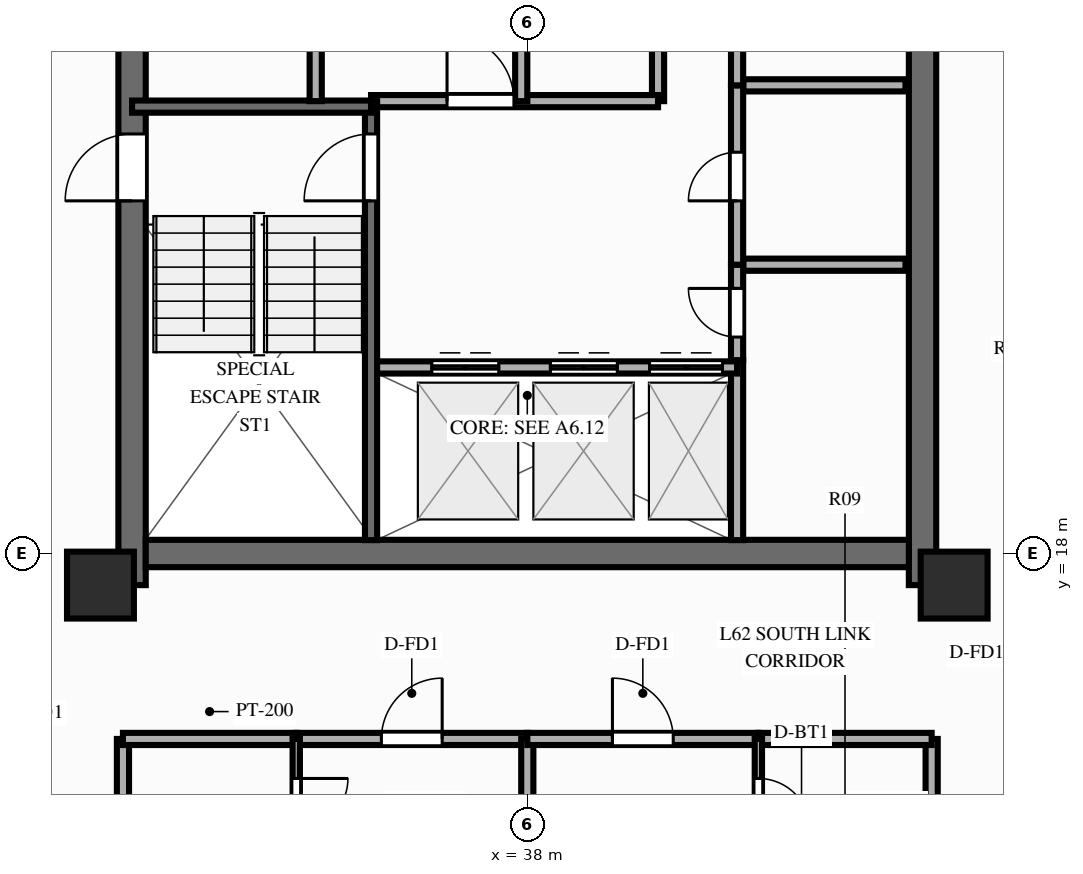
"""IFC4 building model, lengths in metres.
Left out: names, types, materials, properties, quantities, classifications, styles, units other than length and angle.
Written with IfcOpenShell. Run it as: python <this file> out.ifc"""

import sys

from ifc_helpers import new_model, si_unit, direction, frame, frame_2d, origin, origin_2d, place, context, subcontext, project, spatial, rectangle, extrude, source, transform, mapped, element, fill, save


model = new_model("IFC4")
c1 = context("Model", 3, precision=1e-05, world=origin(), true_north=direction((0.0, 1.0)))
c2 = subcontext(c1, "Body", "Model", "MODEL_VIEW")
j1 = project(units=[si_unit("LENGTHUNIT", "METRE"), si_unit("PLANEANGLEUNIT", "RADIAN")], contexts=[c1])
p1 = place(None, origin())
s1 = spatial("IfcSite", under=j1, at=p1, CompositionType="ELEMENT")
p2 = place(p1, origin())
s2 = spatial("IfcBuilding", under=s1, at=p2, CompositionType="ELEMENT")
p3 = place(p2, frame((0.0, 0.0, 199.6)))
s3 = spatial("IfcBuildingStorey", under=s2, at=p3, CompositionType="ELEMENT", Elevation=199.6)
p4 = place(p3, frame((31.5, 17.48, 0.0), z_axis=(0.0, 0.0, 1.0), x_axis=(0.0, 1.0, 0.0)))
e1 = element("IfcWall", 1, at=p4, inside=s3, PredefinedType="SHEAR", context=c2, shape_type="SweptSolid", body=[
    extrude(rectangle(XDim=19.04, YDim=0.45, at=frame_2d((9.52, 0.0))), origin(), (0.0, 0.0, 1.0), 3.0),
])
p5 = place(p4, frame((6.32, 0.0, 0.0)))
e2 = element("IfcOpeningElement", 2, at=p5, cuts=e1, PredefinedType="OPENING", context=c2, shape_type="SweptSolid", body=[
    extrude(rectangle(XDim=1.1, YDim=2.15, at=frame_2d((0.55, 1.075))), frame((0.0, 0.237, 0.0), z_axis=(0.0, -1.0, 0.0), x_axis=(1.0, 0.0, 0.0)), (0.0, 0.0, 1.0), 0.474),
])
p6 = place(p3, frame((44.5, 17.48, 0.0), z_axis=(0.0, 0.0, 1.0), x_axis=(0.0, 1.0, 0.0)))
e3 = element("IfcWall", 3, at=p6, inside=s3, PredefinedType="SHEAR", context=c2, shape_type="SweptSolid", body=[
    extrude(rectangle(XDim=19.04, YDim=0.45, at=frame_2d((9.52, 0.0))), origin(), (0.0, 0.0, 1.0), 3.0),
])
p7 = place(p6, frame((12.67, 0.0, 0.0), z_axis=(0.0, 0.0, 1.0), x_axis=(-1.0, 0.0, 0.0)))
e4 = element("IfcOpeningElement", 4, at=p7, cuts=e3, PredefinedType="OPENING", context=c2, shape_type="SweptSolid", body=[
    extrude(rectangle(XDim=1.1, YDim=2.15, at=frame_2d((0.55, 1.075))), frame((0.0, 0.237, 0.0), z_axis=(0.0, -1.0, 0.0), x_axis=(1.0, 0.0, 0.0)), (0.0, 0.0, 1.0), 0.474),
])
p8 = place(p3, frame((31.725, 18.0, 0.0), z_axis=(0.0, 0.0, 1.0), x_axis=(1.0, 0.0, 0.0)))
e5 = element("IfcWall", 5, at=p8, inside=s3, PredefinedType="SHEAR", context=c2, shape_type="SweptSolid", body=[
    extrude(rectangle(XDim=12.55, YDim=0.45, at=frame_2d((6.275, 0.0))), origin(), (0.0, 0.0, 1.0), 3.0),
])
m1 = source(origin(), c2, "Body", "SweptSolid", [
    extrude(rectangle(XDim=1.1, YDim=1.1, at=origin_2d()), origin(), (0.0, 0.0, 1.0), 3.0),
])
for number, where, z_axis, x_axis in (
    (6, (30.98, 17.48, 0.0), (0.0, 0.0, 1.0), (1.0, 0.0, 0.0)),
    (7, (45.02, 17.48, 0.0), (0.0, 0.0, 1.0), (1.0, 0.0, 0.0)),
):
    element("IfcColumn", number, at=place(p3, frame(where, z_axis=z_axis, x_axis=x_axis)), inside=s3, PredefinedType="COLUMN", context=c2, shape_type="MappedRepresentation", body=[
        mapped(m1, transform((0.0, 0.0, 0.0), scale=1.0)),
    ])
p9 = place(p3, frame((41.55, 22.75, 0.0), z_axis=(0.0, 0.0, 1.0), x_axis=(1.0, 0.0, 0.0)))
e8 = element("IfcWall", 8, at=p9, inside=s3, PredefinedType="PARTITIONING", context=c2, shape_type="SweptSolid", body=[
    extrude(rectangle(XDim=2.67, YDim=0.2, at=frame_2d((1.335, 0.0))), origin(), (0.0, 0.0, 1.0), 2.79),
])
p10 = place(p3, frame((41.55, 25.7, 0.0), z_axis=(0.0, 0.0, 1.0), x_axis=(1.0, 0.0, 0.0)))
e9 = element("IfcWall", 9, at=p10, inside=s3, PredefinedType="PARTITIONING", context=c2, shape_type="SweptSolid", body=[
    extrude(rectangle(XDim=2.67, YDim=0.2, at=frame_2d((1.335, 0.0))), origin(), (0.0, 0.0, 1.0), 2.14),
])
p11 = place(p3, frame((41.45, 18.22, 0.0), z_axis=(0.0, 0.0, 1.0), x_axis=(0.0, 1.0, 0.0)))
e10 = element("IfcWall", 10, at=p11, inside=s3, PredefinedType="PARTITIONING", context=c2, shape_type="SweptSolid", body=[
    extrude(rectangle(XDim=2.96, YDim=0.2, at=frame_2d((1.48, 0.0))), origin(), (0.0, 0.0, 1.0), 2.79),
])
p12 = place(p3, frame((41.45, 21.18, 0.0), z_axis=(0.0, 0.0, 1.0), x_axis=(0.0, 1.0, 0.0)))
e11 = element("IfcWall", 11, at=p12, inside=s3, PredefinedType="PARTITIONING", context=c2, shape_type="SweptSolid", body=[
    extrude(rectangle(XDim=1.57, YDim=0.2, at=frame_2d((0.785, 0.0))), origin(), (0.0, 0.0, 1.0), 2.79),
])
p13 = place(p12, frame((0.38, 0.0, 0.0)))
e12 = element("IfcOpeningElement", 12, at=p13, cuts=e11, PredefinedType="OPENING", context=c2, shape_type="SweptSolid", body=[
    extrude(rectangle(XDim=0.8, YDim=2.05, at=frame_2d((0.4, 1.025))), frame((0.0, 0.112, 0.0), z_axis=(0.0, -1.0, 0.0), x_axis=(1.0, 0.0, 0.0)), (0.0, 0.0, 1.0), 0.224),
])
p14 = place(p3, frame((41.45, 22.75, 0.0), z_axis=(0.0, 0.0, 1.0), x_axis=(0.0, 1.0, 0.0)))
e13 = element("IfcWall", 13, at=p14, inside=s3, PredefinedType="PARTITIONING", context=c2, shape_type="SweptSolid", body=[
    extrude(rectangle(XDim=2.95, YDim=0.2, at=frame_2d((1.475, 0.0))), origin(), (0.0, 0.0, 1.0), 2.79),
])
p15 = place(p14, frame((1.05, 0.0, 0.0)))
e14 = element("IfcOpeningElement", 14, at=p15, cuts=e13, PredefinedType="OPENING", context=c2, shape_type="SweptSolid", body=[
    extrude(rectangle(XDim=0.8, YDim=2.05, at=frame_2d((0.4, 1.025))), frame((0.0, 0.112, 0.0), z_axis=(0.0, -1.0, 0.0), x_axis=(1.0, 0.0, 0.0)), (0.0, 0.0, 1.0), 0.224),
])
p16 = place(p3, frame((41.45, 25.7, 0.0), z_axis=(0.0, 0.0, 1.0), x_axis=(0.0, 1.0, 0.0)))
e15 = element("IfcWall", 15, at=p16, inside=s3, PredefinedType="PARTITIONING", context=c2, shape_type="SweptSolid", body=[
    extrude(rectangle(XDim=2.9, YDim=0.2, at=frame_2d((1.45, 0.0))), origin(), (0.0, 0.0, 1.0), 2.79),
])
p17 = place(p16, frame((1.0, 0.0, 0.0)))
e16 = element("IfcOpeningElement", 16, at=p17, cuts=e15, PredefinedType="OPENING", context=c2, shape_type="SweptSolid", body=[
    extrude(rectangle(XDim=0.9, YDim=2.1, at=frame_2d((0.45, 1.05))), frame((0.0, 0.112, 0.0), z_axis=(0.0, -1.0, 0.0), x_axis=(1.0, 0.0, 0.0)), (0.0, 0.0, 1.0), 0.224),
])
p18 = place(p3, frame((40.15, 25.44, 0.0), z_axis=(0.0, 0.0, 1.0), x_axis=(0.0, 1.0, 0.0)))
e17 = element("IfcWall", 17, at=p18, inside=s3, PredefinedType="PARTITIONING", context=c2, shape_type="SweptSolid", body=[
    extrude(rectangle(XDim=6.36, YDim=0.2, at=frame_2d((3.18, 0.0))), origin(), (0.0, 0.0, 1.0), 2.79),
])
p19 = place(p3, frame((35.43, 21.06, 0.0), z_axis=(0.0, 0.0, 1.0), x_axis=(1.0, 0.0, 0.0)))
e18 = element("IfcWall", 18, at=p19, inside=s3, PredefinedType="PARTITIONING", context=c2, shape_type="SweptSolid", body=[
    extrude(rectangle(XDim=6.02, YDim=0.2, at=frame_2d((3.01, 0.0))), origin(), (0.0, 0.0, 1.0), 2.79),
])
p20 = place(p19, frame((1.0, 0.0, 0.0)))
e19 = element("IfcOpeningElement", 19, at=p20, cuts=e18, PredefinedType="OPENING", context=c2, shape_type="SweptSolid", body=[
    extrude(rectangle(XDim=1.1, YDim=2.15, at=frame_2d((0.55, 1.075))), frame((0.0, 0.112, 0.0), z_axis=(0.0, -1.0, 0.0), x_axis=(1.0, 0.0, 0.0)), (0.0, 0.0, 1.0), 0.224),
])
p21 = place(p19, frame((2.95, 0.0, 0.0)))
e20 = element("IfcOpeningElement", 20, at=p21, cuts=e18, PredefinedType="OPENING", context=c2, shape_type="SweptSolid", body=[
    extrude(rectangle(XDim=1.1, YDim=2.15, at=frame_2d((0.55, 1.075))), frame((0.0, 0.112, 0.0), z_axis=(0.0, -1.0, 0.0), x_axis=(1.0, 0.0, 0.0)), (0.0, 0.0, 1.0), 0.224),
])
p22 = place(p19, frame((4.58, 0.0, 0.0)))
e21 = element("IfcOpeningElement", 21, at=p22, cuts=e18, PredefinedType="OPENING", context=c2, shape_type="SweptSolid", body=[
    extrude(rectangle(XDim=1.2, YDim=2.15, at=frame_2d((0.6, 1.075))), frame((0.0, 0.112, 0.0), z_axis=(0.0, -1.0, 0.0), x_axis=(1.0, 0.0, 0.0)), (0.0, 0.0, 1.0), 0.224),
])
p23 = place(p3, frame((35.43, 25.44, 0.0), z_axis=(0.0, 0.0, 1.0), x_axis=(1.0, 0.0, 0.0)))
e22 = element("IfcWall", 22, at=p23, inside=s3, PredefinedType="PARTITIONING", context=c2, shape_type="SweptSolid", body=[
    extrude(rectangle(XDim=4.72, YDim=0.2, at=frame_2d((2.36, 0.0))), origin(), (0.0, 0.0, 1.0), 2.79),
])
p24 = place(p23, frame((1.25, 0.0, 0.0)))
e23 = element("IfcOpeningElement", 23, at=p24, cuts=e22, PredefinedType="OPENING", context=c2, shape_type="SweptSolid", body=[
    extrude(rectangle(XDim=1.1, YDim=2.15, at=frame_2d((0.55, 1.075))), frame((0.0, 0.112, 0.0), z_axis=(0.0, -1.0, 0.0), x_axis=(1.0, 0.0, 0.0)), (0.0, 0.0, 1.0), 0.224),
])
p25 = place(p3, frame((35.43, 18.22, 0.0), z_axis=(0.0, 0.0, 1.0), x_axis=(0.0, 1.0, 0.0)))
e24 = element("IfcWall", 24, at=p25, inside=s3, PredefinedType="SOLIDWALL", context=c2, shape_type="SweptSolid", body=[
    extrude(rectangle(XDim=7.22, YDim=0.2, at=frame_2d((3.61, 0.0))), origin(), (0.0, 0.0, 1.0), 2.79),
])
p26 = place(p25, frame((6.68, 0.0, 0.0), z_axis=(0.0, 0.0, 1.0), x_axis=(-1.0, 0.0, 0.0)))
e25 = element("IfcOpeningElement", 25, at=p26, cuts=e24, PredefinedType="OPENING", context=c2, shape_type="SweptSolid", body=[
    extrude(rectangle(XDim=1.1, YDim=2.15, at=frame_2d((0.55, 1.075))), frame((0.0, 0.112, 0.0), z_axis=(0.0, -1.0, 0.0), x_axis=(1.0, 0.0, 0.0)), (0.0, 0.0, 1.0), 0.224),
])
p27 = place(p3, frame((31.5, 25.35, 0.0), z_axis=(0.0, 0.0, 1.0), x_axis=(1.0, 0.0, 0.0)))
e26 = element("IfcWall", 26, at=p27, inside=s3, PredefinedType="SOLIDWALL", context=c2, shape_type="SweptSolid", body=[
    extrude(rectangle(XDim=3.93, YDim=0.2, at=frame_2d((1.965, 0.0))), origin(), (0.0, 0.0, 1.0), 2.79),
])
p28 = place(p3, frame((34.52, 25.44, 0.0), z_axis=(0.0, 0.0, 1.0), x_axis=(0.0, 1.0, 0.0)))
e27 = element("IfcWall", 27, at=p28, inside=s3, PredefinedType="PARTITIONING", context=c2, shape_type="SweptSolid", body=[
    extrude(rectangle(XDim=10.34, YDim=0.2, at=frame_2d((5.17, 0.0))), origin(), (0.0, 0.0, 1.0), 2.79),
])
p29 = place(p28, frame((1.15, 0.0, 0.0)))
e28 = element("IfcOpeningElement", 28, at=p29, cuts=e27, PredefinedType="OPENING", context=c2, shape_type="SweptSolid", body=[
    extrude(rectangle(XDim=0.9, YDim=2.1, at=frame_2d((0.45, 1.05))), frame((0.0, 0.112, 0.0), z_axis=(0.0, -1.0, 0.0), x_axis=(1.0, 0.0, 0.0)), (0.0, 0.0, 1.0), 0.224),
])
p30 = place(p28, frame((4.35, 0.0, 0.0)))
e29 = element("IfcOpeningElement", 29, at=p30, cuts=e27, PredefinedType="OPENING", context=c2, shape_type="SweptSolid", body=[
    extrude(rectangle(XDim=0.9, YDim=2.1, at=frame_2d((0.45, 1.05))), frame((0.0, 0.112, 0.0), z_axis=(0.0, -1.0, 0.0), x_axis=(1.0, 0.0, 0.0)), (0.0, 0.0, 1.0), 0.224),
])
p31 = place(p28, frame((7.01, 0.0, 0.0)))
e30 = element("IfcOpeningElement", 30, at=p31, cuts=e27, PredefinedType="OPENING", context=c2, shape_type="SweptSolid", body=[
    extrude(rectangle(XDim=1.0, YDim=2.15, at=frame_2d((0.5, 1.075))), frame((0.0, 0.112, 0.0), z_axis=(0.0, -1.0, 0.0), x_axis=(1.0, 0.0, 0.0)), (0.0, 0.0, 1.0), 0.224),
])
p32 = place(p28, frame((8.76, 0.0, 0.0)))
e31 = element("IfcOpeningElement", 31, at=p32, cuts=e27, PredefinedType="OPENING", context=c2, shape_type="SweptSolid", body=[
    extrude(rectangle(XDim=1.0, YDim=2.15, at=frame_2d((0.5, 1.075))), frame((0.0, 0.112, 0.0), z_axis=(0.0, -1.0, 0.0), x_axis=(1.0, 0.0, 0.0)), (0.0, 0.0, 1.0), 0.224),
])
p33 = place(p3, frame((37.9, 25.44, 0.0), z_axis=(0.0, 0.0, 1.0), x_axis=(0.0, 1.0, 0.0)))
e32 = element("IfcWall", 32, at=p33, inside=s3, PredefinedType="PARTITIONING", context=c2, shape_type="SweptSolid", body=[
    extrude(rectangle(XDim=10.34, YDim=0.2, at=frame_2d((5.17, 0.0))), origin(), (0.0, 0.0, 1.0), 2.79),
])
p34 = place(p33, frame((2.6, 0.0, 0.0)))
e33 = element("IfcOpeningElement", 33, at=p34, cuts=e32, PredefinedType="OPENING", context=c2, shape_type="SweptSolid", body=[
    extrude(rectangle(XDim=0.9, YDim=2.1, at=frame_2d((0.45, 1.05))), frame((0.0, 0.112, 0.0), z_axis=(0.0, -1.0, 0.0), x_axis=(1.0, 0.0, 0.0)), (0.0, 0.0, 1.0), 0.224),
])
p35 = place(p33, frame((6.86, 0.0, 0.0)))
e34 = element("IfcOpeningElement", 34, at=p35, cuts=e32, PredefinedType="OPENING", context=c2, shape_type="SweptSolid", body=[
    extrude(rectangle(XDim=1.0, YDim=2.15, at=frame_2d((0.5, 1.075))), frame((0.0, 0.112, 0.0), z_axis=(0.0, -1.0, 0.0), x_axis=(1.0, 0.0, 0.0)), (0.0, 0.0, 1.0), 0.224),
])
p36 = place(p33, frame((8.71, 0.0, 0.0)))
e35 = element("IfcOpeningElement", 35, at=p36, cuts=e32, PredefinedType="OPENING", context=c2, shape_type="SweptSolid", body=[
    extrude(rectangle(XDim=1.0, YDim=2.15, at=frame_2d((0.5, 1.075))), frame((0.0, 0.112, 0.0), z_axis=(0.0, -1.0, 0.0), x_axis=(1.0, 0.0, 0.0)), (0.0, 0.0, 1.0), 0.224),
])
for number, where, z_axis, x_axis in (
    (36, (31.35, 14.95, 0.0), (0.0, 0.0, 1.0), (0.0, -1.0, 0.0)),
    (37, (44.65, 14.95, 0.0), (0.0, 0.0, 1.0), (0.0, -1.0, 0.0)),
):
    element("IfcWall", number, at=place(p3, frame(where, z_axis=z_axis, x_axis=x_axis)), inside=s3, PredefinedType="PARTITIONING", context=c2, shape_type="SweptSolid", body=[
        extrude(rectangle(XDim=8.8, YDim=0.2, at=frame_2d((4.4, 0.0))), origin(), (0.0, 0.0, 1.0), 2.39),
    ])
p37 = place(p3, frame((31.35, 14.95, 0.0), z_axis=(0.0, 0.0, 1.0), x_axis=(1.0, 0.0, 0.0)))
e38 = element("IfcWall", 38, at=p37, inside=s3, PredefinedType="PARTITIONING", context=c2, shape_type="SweptSolid", body=[
    extrude(rectangle(XDim=2.85, YDim=0.2, at=frame_2d((1.425, 0.0))), origin(), (0.0, 0.0, 1.0), 2.79),
])
p38 = place(p3, frame((34.2, 14.95, 0.0), z_axis=(0.0, 0.0, 1.0), x_axis=(1.0, 0.0, 0.0)))
e39 = element("IfcWall", 39, at=p38, inside=s3, PredefinedType="PARTITIONING", context=c2, shape_type="SweptSolid", body=[
    extrude(rectangle(XDim=3.8, YDim=0.2, at=frame_2d((1.9, 0.0))), origin(), (0.0, 0.0, 1.0), 2.79),
])
p39 = place(p38, frame((1.4, 0.0, 0.0)))
e40 = element("IfcOpeningElement", 40, at=p39, cuts=e39, PredefinedType="OPENING", context=c2, shape_type="SweptSolid", body=[
    extrude(rectangle(XDim=1.0, YDim=2.15, at=frame_2d((0.5, 1.075))), frame((0.0, 0.112, 0.0), z_axis=(0.0, -1.0, 0.0), x_axis=(1.0, 0.0, 0.0)), (0.0, 0.0, 1.0), 0.224),
])
p40 = place(p3, frame((34.2, 14.95, 0.0), z_axis=(0.0, 0.0, 1.0), x_axis=(0.0, -1.0, 0.0)))
e41 = element("IfcWall", 41, at=p40, inside=s3, PredefinedType="PARTITIONING", context=c2, shape_type="SweptSolid", body=[
    extrude(rectangle(XDim=2.15, YDim=0.12, at=frame_2d((1.075, 0.0))), origin(), (0.0, 0.0, 1.0), 2.79),
])
p41 = place(p40, frame((0.65, 0.0, 0.0)))
e42 = element("IfcOpeningElement", 42, at=p41, cuts=e41, PredefinedType="OPENING", context=c2, shape_type="SweptSolid", body=[
    extrude(rectangle(XDim=0.85, YDim=2.05, at=frame_2d((0.425, 1.025))), frame((0.0, 0.072, 0.0), z_axis=(0.0, -1.0, 0.0), x_axis=(1.0, 0.0, 0.0)), (0.0, 0.0, 1.0), 0.144),
])
p42 = place(p3, frame((38.0, 14.95, 0.0), z_axis=(0.0, 0.0, 1.0), x_axis=(0.0, -1.0, 0.0)))
e43 = element("IfcWall", 43, at=p42, inside=s3, PredefinedType="PARTITIONING", context=c2, shape_type="SweptSolid", body=[
    extrude(rectangle(XDim=8.8, YDim=0.2, at=frame_2d((4.4, 0.0))), origin(), (0.0, 0.0, 1.0), 2.79),
])
p43 = place(p3, frame((38.0, 14.95, 0.0), z_axis=(0.0, 0.0, 1.0), x_axis=(1.0, 0.0, 0.0)))
e44 = element("IfcWall", 44, at=p43, inside=s3, PredefinedType="PARTITIONING", context=c2, shape_type="SweptSolid", body=[
    extrude(rectangle(XDim=3.8, YDim=0.2, at=frame_2d((1.9, 0.0))), origin(), (0.0, 0.0, 1.0), 2.79),
])
p44 = place(p43, frame((1.4, 0.0, 0.0)))
e45 = element("IfcOpeningElement", 45, at=p44, cuts=e44, PredefinedType="OPENING", context=c2, shape_type="SweptSolid", body=[
    extrude(rectangle(XDim=1.0, YDim=2.15, at=frame_2d((0.5, 1.075))), frame((0.0, 0.112, 0.0), z_axis=(0.0, -1.0, 0.0), x_axis=(1.0, 0.0, 0.0)), (0.0, 0.0, 1.0), 0.224),
])
p45 = place(p3, frame((41.8, 14.95, 0.0), z_axis=(0.0, 0.0, 1.0), x_axis=(1.0, 0.0, 0.0)))
e46 = element("IfcWall", 46, at=p45, inside=s3, PredefinedType="PARTITIONING", context=c2, shape_type="SweptSolid", body=[
    extrude(rectangle(XDim=2.85, YDim=0.2, at=frame_2d((1.425, 0.0))), origin(), (0.0, 0.0, 1.0), 2.79),
])
p46 = place(p3, frame((41.8, 14.95, 0.0), z_axis=(0.0, 0.0, 1.0), x_axis=(0.0, -1.0, 0.0)))
e47 = element("IfcWall", 47, at=p46, inside=s3, PredefinedType="PARTITIONING", context=c2, shape_type="SweptSolid", body=[
    extrude(rectangle(XDim=2.15, YDim=0.12, at=frame_2d((1.075, 0.0))), origin(), (0.0, 0.0, 1.0), 2.79),
])
p47 = place(p46, frame((0.65, 0.0, 0.0)))
e48 = element("IfcOpeningElement", 48, at=p47, cuts=e47, PredefinedType="OPENING", context=c2, shape_type="SweptSolid", body=[
    extrude(rectangle(XDim=0.85, YDim=2.05, at=frame_2d((0.425, 1.025))), frame((0.0, 0.072, 0.0), z_axis=(0.0, -1.0, 0.0), x_axis=(1.0, 0.0, 0.0)), (0.0, 0.0, 1.0), 0.144),
])
m2 = source(origin(), c2, "Body", "SweptSolid", [
    extrude(rectangle(XDim=1.1, YDim=2.15, at=frame_2d((0.55, 1.075))), frame((0.0, 0.025, 0.0), z_axis=(0.0, -1.0, 0.0), x_axis=(1.0, 0.0, 0.0)), (0.0, 0.0, 1.0), 0.05),
])
p48 = place(p5, origin())
e49 = element("IfcDoor", 49, at=p48, inside=s3, OperationType="SINGLE_SWING_LEFT", PredefinedType="DOOR", context=c2, shape_type="MappedRepresentation", body=[
    mapped(m2, transform((0.0, 0.0, 0.0), scale=1.0)),
])
fill(e2, e49)
m3 = source(origin(), c2, "Body", "SweptSolid", [
    extrude(rectangle(XDim=0.8, YDim=2.05, at=frame_2d((0.4, 1.025))), frame((0.0, 0.025, 0.0), z_axis=(0.0, -1.0, 0.0), x_axis=(1.0, 0.0, 0.0)), (0.0, 0.0, 1.0), 0.05),
])
p49 = place(p13, origin())
e50 = element("IfcDoor", 50, at=p49, inside=s3, OperationType="SINGLE_SWING_RIGHT", PredefinedType="DOOR", context=c2, shape_type="MappedRepresentation", body=[
    mapped(m3, transform((0.0, 0.0, 0.0), scale=1.0)),
])
fill(e12, e50)
p50 = place(p15, origin())
e51 = element("IfcDoor", 51, at=p50, inside=s3, OperationType="SINGLE_SWING_LEFT", PredefinedType="DOOR", context=c2, shape_type="MappedRepresentation", body=[
    mapped(m3, transform((0.0, 0.0, 0.0), scale=1.0)),
])
fill(e14, e51)
p51 = place(p20, origin())
e52 = element("IfcDoor", 52, at=p51, inside=s3, OperationType="DOUBLE_DOOR_SLIDING", PredefinedType="DOOR", context=c2, shape_type="MappedRepresentation", body=[
    mapped(m2, transform((0.0, 0.0, 0.0), scale=1.0)),
])
fill(e19, e52)
p52 = place(p21, origin())
e53 = element("IfcDoor", 53, at=p52, inside=s3, OperationType="DOUBLE_DOOR_SLIDING", PredefinedType="DOOR", context=c2, shape_type="MappedRepresentation", body=[
    mapped(m2, transform((0.0, 0.0, 0.0), scale=1.0)),
])
fill(e20, e53)
m4 = source(origin(), c2, "Body", "SweptSolid", [
    extrude(rectangle(XDim=1.2, YDim=2.15, at=frame_2d((0.6, 1.075))), frame((0.0, 0.025, 0.0), z_axis=(0.0, -1.0, 0.0), x_axis=(1.0, 0.0, 0.0)), (0.0, 0.0, 1.0), 0.05),
])
p53 = place(p22, origin())
e54 = element("IfcDoor", 54, at=p53, inside=s3, OperationType="DOUBLE_DOOR_SLIDING", PredefinedType="DOOR", context=c2, shape_type="MappedRepresentation", body=[
    mapped(m4, transform((0.0, 0.0, 0.0), scale=1.0)),
])
fill(e21, e54)
p54 = place(p24, origin())
e55 = element("IfcDoor", 55, at=p54, inside=s3, OperationType="SINGLE_SWING_LEFT", PredefinedType="DOOR", context=c2, shape_type="MappedRepresentation", body=[
    mapped(m2, transform((0.0, 0.0, 0.0), scale=1.0)),
])
fill(e23, e55)
p55 = place(p26, origin())
e56 = element("IfcDoor", 56, at=p55, inside=s3, OperationType="SINGLE_SWING_RIGHT", PredefinedType="DOOR", context=c2, shape_type="MappedRepresentation", body=[
    mapped(m2, transform((0.0, 0.0, 0.0), scale=1.0)),
])
fill(e25, e56)
m5 = source(origin(), c2, "Body", "SweptSolid", [
    extrude(rectangle(XDim=1.0, YDim=2.15, at=frame_2d((0.5, 1.075))), frame((0.0, 0.025, 0.0), z_axis=(0.0, -1.0, 0.0), x_axis=(1.0, 0.0, 0.0)), (0.0, 0.0, 1.0), 0.05),
])
p56 = place(p39, origin())
e57 = element("IfcDoor", 57, at=p56, inside=s3, OperationType="SINGLE_SWING_RIGHT", PredefinedType="DOOR", context=c2, shape_type="MappedRepresentation", body=[
    mapped(m5, transform((0.0, 0.0, 0.0), scale=1.0)),
])
fill(e40, e57)
m6 = source(origin(), c2, "Body", "SweptSolid", [
    extrude(rectangle(XDim=0.85, YDim=2.05, at=frame_2d((0.425, 1.025))), frame((0.0, 0.025, 0.0), z_axis=(0.0, -1.0, 0.0), x_axis=(1.0, 0.0, 0.0)), (0.0, 0.0, 1.0), 0.05),
])
p57 = place(p41, origin())
e58 = element("IfcDoor", 58, at=p57, inside=s3, OperationType="SINGLE_SWING_LEFT", PredefinedType="DOOR", context=c2, shape_type="MappedRepresentation", body=[
    mapped(m6, transform((0.0, 0.0, 0.0), scale=1.0)),
])
fill(e42, e58)
p58 = place(p44, origin())
e59 = element("IfcDoor", 59, at=p58, inside=s3, OperationType="SINGLE_SWING_LEFT", PredefinedType="DOOR", context=c2, shape_type="MappedRepresentation", body=[
    mapped(m5, transform((0.0, 0.0, 0.0), scale=1.0)),
])
fill(e45, e59)
p59 = place(p47, origin())
e60 = element("IfcDoor", 60, at=p59, inside=s3, OperationType="SINGLE_SWING_RIGHT", PredefinedType="DOOR", context=c2, shape_type="MappedRepresentation", body=[
    mapped(m6, transform((0.0, 0.0, 0.0), scale=1.0)),
])
fill(e48, e60)
save(model, sys.argv[1])
